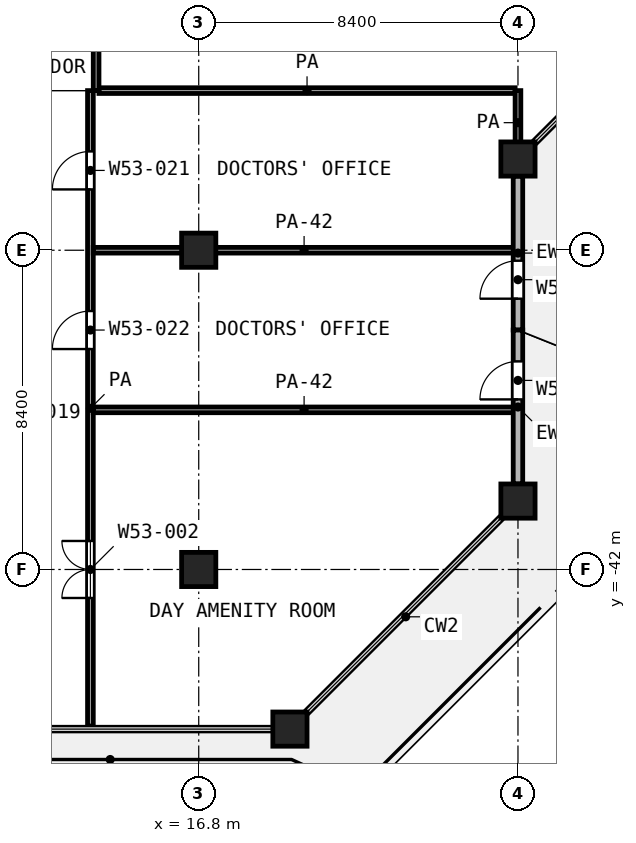
"""IFC4 building model, lengths in metres.
Left out: names, types, materials, properties, quantities, classifications, styles, units other than length and angle.
Written with IfcOpenShell. Run it as: python <this file> out.ifc"""

import sys

from ifc_helpers import new_model, si_unit, direction, frame, frame_2d, origin, origin_2d, place, context, subcontext, project, spatial, rectangle, extrude, element, fill, save


model = new_model("IFC4")
c1 = context("Model", 3, precision=1e-05, world=origin(), true_north=direction((0.0, 1.0)))
c2 = subcontext(c1, "Body", "Model", "MODEL_VIEW")
j1 = project(units=[si_unit("LENGTHUNIT", "METRE"), si_unit("PLANEANGLEUNIT", "RADIAN")], contexts=[c1])
p1 = place(None, origin())
s1 = spatial("IfcSite", under=j1, at=p1, CompositionType="ELEMENT")
p2 = place(p1, origin())
s2 = spatial("IfcBuilding", under=s1, at=p2, CompositionType="ELEMENT")
p3 = place(p2, frame((0.0, 0.0, 230.6)))
s3 = spatial("IfcBuildingStorey", under=s2, at=p3, CompositionType="ELEMENT", Elevation=230.6)
for number, where, z_axis, x_axis in (
    (1, (25.2, -31.2, 0.0), (0.0, 0.0, 1.0), (1.0, 0.0, 0.0)),
    (2, (16.8, -33.6, 0.0), (0.0, 0.0, 1.0), (1.0, 0.0, 0.0)),
    (3, (25.2, -40.2, 0.0), (0.0, 0.0, 1.0), (1.0, 0.0, 0.0)),
    (4, (16.8, -42.0, 0.0), (0.0, 0.0, 1.0), (1.0, 0.0, 0.0)),
    (5, (19.2, -46.2, 0.0), (0.0, 0.0, 1.0), (1.0, 0.0, 0.0)),
):
    element("IfcColumn", number, at=place(p3, frame(where, z_axis=z_axis, x_axis=x_axis)), inside=s3, PredefinedType="COLUMN", context=c2, shape_type="SweptSolid", body=[
        extrude(rectangle(XDim=0.9, YDim=0.9, at=origin_2d()), origin(), (0.0, 0.0, 1.0), 4.2),
    ])
p4 = place(p3, frame((25.2, -39.75, 0.0), z_axis=(0.0, 0.0, 1.0), x_axis=(0.0, 1.0, 0.0)))
e6 = element("IfcWall", 6, at=p4, inside=s3, PredefinedType="SOLIDWALL", context=c2, shape_type="SweptSolid", body=[
    extrude(rectangle(XDim=4.05, YDim=0.25, at=frame_2d((2.025, 0.0))), origin(), (0.0, 0.0, 1.0), 2.58),
])
p5 = place(p4, frame((2.225, 0.0, 0.0)))
e7 = element("IfcOpeningElement", 7, at=p5, cuts=e6, PredefinedType="OPENING", context=c2, shape_type="SweptSolid", body=[
    extrude(rectangle(XDim=1.0, YDim=2.1, at=frame_2d((0.5, 1.05))), frame((0.0, 0.135, 0.0), z_axis=(0.0, -1.0, 0.0), x_axis=(1.0, 0.0, 0.0)), (0.0, 0.0, 1.0), 0.27),
])
p6 = place(p3, frame((25.2, -35.7, 0.0), z_axis=(0.0, 0.0, 1.0), x_axis=(0.0, 1.0, 0.0)))
e8 = element("IfcWall", 8, at=p6, inside=s3, PredefinedType="SOLIDWALL", context=c2, shape_type="SweptSolid", body=[
    extrude(rectangle(XDim=4.05, YDim=0.25, at=frame_2d((2.025, 0.0))), origin(), (0.0, 0.0, 1.0), 2.58),
])
p7 = place(p6, frame((0.825, 0.0, 0.0)))
e9 = element("IfcOpeningElement", 9, at=p7, cuts=e8, PredefinedType="OPENING", context=c2, shape_type="SweptSolid", body=[
    extrude(rectangle(XDim=1.0, YDim=2.1, at=frame_2d((0.5, 1.05))), frame((0.0, 0.135, 0.0), z_axis=(0.0, -1.0, 0.0), x_axis=(1.0, 0.0, 0.0)), (0.0, 0.0, 1.0), 0.27),
])
for number, where, z_axis, x_axis in (
    (10, (14.025, -37.8, 0.0), (0.0, 0.0, 1.0), (1.0, 0.0, 0.0)),
    (11, (14.025, -33.6, 0.0), (0.0, 0.0, 1.0), (1.0, 0.0, 0.0)),
):
    element("IfcWall", number, at=place(p3, frame(where, z_axis=z_axis, x_axis=x_axis)), inside=s3, PredefinedType="PARTITIONING", context=c2, shape_type="SweptSolid", body=[
        extrude(rectangle(XDim=11.095, YDim=0.15, at=frame_2d((5.548, 0.0))), origin(), (0.0, 0.0, 1.0), 2.7),
    ])
p8 = place(p3, frame((14.175, -29.4, 0.0), z_axis=(0.0, 0.0, 1.0), x_axis=(1.0, 0.0, 0.0)))
e12 = element("IfcWall", 12, at=p8, inside=s3, PredefinedType="PARTITIONING", context=c2, shape_type="SweptSolid", body=[
    extrude(rectangle(XDim=10.95, YDim=0.15, at=frame_2d((5.475, 0.0))), origin(), (0.0, 0.0, 1.0), 3.6),
])
p9 = place(p3, frame((13.95, -46.12, 0.0), z_axis=(0.0, 0.0, 1.0), x_axis=(0.0, 1.0, 0.0)))
e13 = element("IfcWall", 13, at=p9, inside=s3, PredefinedType="PARTITIONING", context=c2, shape_type="SweptSolid", body=[
    extrude(rectangle(XDim=16.72, YDim=0.15, at=frame_2d((8.36, 0.0))), origin(), (0.0, 0.0, 1.0), 3.6),
])
p10 = place(p9, frame((14.12, 0.0, 0.0)))
e14 = element("IfcOpeningElement", 14, at=p10, cuts=e13, PredefinedType="OPENING", context=c2, shape_type="SweptSolid", body=[
    extrude(rectangle(XDim=1.0, YDim=2.1, at=frame_2d((0.5, 1.05))), frame((0.0, 0.085, 0.0), z_axis=(0.0, -1.0, 0.0), x_axis=(1.0, 0.0, 0.0)), (0.0, 0.0, 1.0), 0.17),
])
p11 = place(p9, frame((9.92, 0.0, 0.0)))
e15 = element("IfcOpeningElement", 15, at=p11, cuts=e13, PredefinedType="OPENING", context=c2, shape_type="SweptSolid", body=[
    extrude(rectangle(XDim=1.0, YDim=2.1, at=frame_2d((0.5, 1.05))), frame((0.0, 0.085, 0.0), z_axis=(0.0, -1.0, 0.0), x_axis=(1.0, 0.0, 0.0)), (0.0, 0.0, 1.0), 0.17),
])
p12 = place(p9, frame((3.37, 0.0, 0.0)))
e16 = element("IfcOpeningElement", 16, at=p12, cuts=e13, PredefinedType="OPENING", context=c2, shape_type="SweptSolid", body=[
    extrude(rectangle(XDim=1.5, YDim=2.1, at=frame_2d((0.75, 1.05))), frame((0.0, 0.085, 0.0), z_axis=(0.0, -1.0, 0.0), x_axis=(1.0, 0.0, 0.0)), (0.0, 0.0, 1.0), 0.17),
])
p13 = place(p3, frame((14.1, -29.4, 0.0), z_axis=(0.0, 0.0, 1.0), x_axis=(0.0, 1.0, 0.0)))
e17 = element("IfcWall", 17, at=p13, inside=s3, PredefinedType="PARTITIONING", context=c2, shape_type="SweptSolid", body=[
    extrude(rectangle(XDim=4.6, YDim=0.15, at=frame_2d((2.3, 0.0))), origin(), (0.0, 0.0, 1.0), 3.6),
])
p14 = place(p3, frame((25.2, -31.087, 0.0), z_axis=(0.0, 0.0, 1.0), x_axis=(0.0, 1.0, 0.0)))
e18 = element("IfcWall", 18, at=p14, inside=s3, PredefinedType="PARTITIONING", context=c2, shape_type="SweptSolid", body=[
    extrude(rectangle(XDim=1.687, YDim=0.15, at=frame_2d((0.844, 0.0))), origin(), (0.0, 0.0, 1.0), 3.6),
])
p15 = place(p5, origin())
e19 = element("IfcDoor", 19, at=p15, inside=s3, OperationType="SINGLE_SWING_LEFT", PredefinedType="DOOR", context=c2, shape_type="SweptSolid", body=[
    extrude(rectangle(XDim=1.0, YDim=2.1, at=frame_2d((0.5, 1.05))), frame((0.0, 0.025, 0.0), z_axis=(0.0, -1.0, 0.0), x_axis=(1.0, 0.0, 0.0)), (0.0, 0.0, 1.0), 0.05),
])
fill(e7, e19)
p16 = place(p7, origin())
e20 = element("IfcDoor", 20, at=p16, inside=s3, OperationType="SINGLE_SWING_LEFT", PredefinedType="DOOR", context=c2, shape_type="SweptSolid", body=[
    extrude(rectangle(XDim=1.0, YDim=2.1, at=frame_2d((0.5, 1.05))), frame((0.0, 0.025, 0.0), z_axis=(0.0, -1.0, 0.0), x_axis=(1.0, 0.0, 0.0)), (0.0, 0.0, 1.0), 0.05),
])
fill(e9, e20)
p17 = place(p10, origin())
e21 = element("IfcDoor", 21, at=p17, inside=s3, OperationType="SINGLE_SWING_LEFT", PredefinedType="DOOR", context=c2, shape_type="SweptSolid", body=[
    extrude(rectangle(XDim=1.0, YDim=2.1, at=frame_2d((0.5, 1.05))), frame((0.0, 0.025, 0.0), z_axis=(0.0, -1.0, 0.0), x_axis=(1.0, 0.0, 0.0)), (0.0, 0.0, 1.0), 0.05),
])
fill(e14, e21)
p18 = place(p11, origin())
e22 = element("IfcDoor", 22, at=p18, inside=s3, OperationType="SINGLE_SWING_LEFT", PredefinedType="DOOR", context=c2, shape_type="SweptSolid", body=[
    extrude(rectangle(XDim=1.0, YDim=2.1, at=frame_2d((0.5, 1.05))), frame((0.0, 0.025, 0.0), z_axis=(0.0, -1.0, 0.0), x_axis=(1.0, 0.0, 0.0)), (0.0, 0.0, 1.0), 0.05),
])
fill(e15, e22)
p19 = place(p12, origin())
e23 = element("IfcDoor", 23, at=p19, inside=s3, OperationType="DOUBLE_DOOR_SINGLE_SWING", PredefinedType="DOOR", context=c2, shape_type="SweptSolid", body=[
    extrude(rectangle(XDim=1.5, YDim=2.1, at=frame_2d((0.75, 1.05))), frame((0.0, 0.025, 0.0), z_axis=(0.0, -1.0, 0.0), x_axis=(1.0, 0.0, 0.0)), (0.0, 0.0, 1.0), 0.05),
])
fill(e16, e23)
save(model, sys.argv[1])
